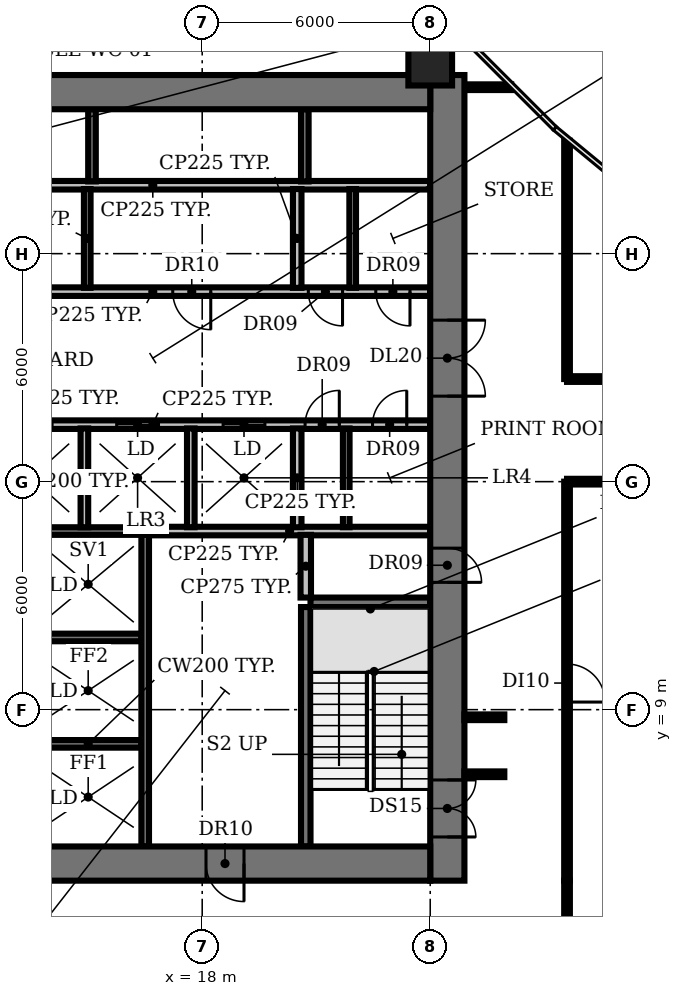
"""IFC4 building model, lengths in metres.
Left out: names, types, materials, properties, quantities, classifications, styles, units other than length and angle.
Written with IfcOpenShell. Run it as: python <this file> out.ifc"""

import sys

from ifc_helpers import new_model, si_unit, direction, frame, frame_2d, origin, origin_2d, place, context, subcontext, project, spatial, rectangle, circle, extrude, element, fill, save


model = new_model("IFC4")
c1 = context("Model", 3, precision=1e-05, world=origin(), true_north=direction((0.0, 1.0)))
c2 = subcontext(c1, "Body", "Model", "MODEL_VIEW")
j1 = project(units=[si_unit("LENGTHUNIT", "METRE"), si_unit("PLANEANGLEUNIT", "RADIAN")], contexts=[c1])
p1 = place(None, origin())
s1 = spatial("IfcSite", under=j1, at=p1, CompositionType="ELEMENT")
p2 = place(p1, origin())
s2 = spatial("IfcBuilding", under=s1, at=p2, CompositionType="ELEMENT")
p3 = place(p2, frame((0.0, 0.0, 75.2)))
s3 = spatial("IfcBuildingStorey", under=s2, at=p3, CompositionType="ELEMENT", Elevation=75.2)
p4 = place(p3, frame((24.0, 26.0, 0.0), z_axis=(0.0, 0.0, 1.0), x_axis=(1.0, 0.0, 0.0)))
e1 = element("IfcColumn", 1, at=p4, inside=s3, PredefinedType="COLUMN", context=c2, shape_type="SweptSolid", body=[
    extrude(circle(Radius=0.575, at=origin_2d()), origin(), (0.0, 0.0, 1.0), 3.2),
])
for number, where, z_axis, x_axis in (
    (2, (13.6, 8.1, 0.0), (0.0, 0.0, 1.0), (1.0, 0.0, 0.0)),
    (3, (13.6, 10.9, 0.0), (0.0, 0.0, 1.0), (1.0, 0.0, 0.0)),
):
    element("IfcWall", number, at=place(p3, frame(where, z_axis=z_axis, x_axis=x_axis)), inside=s3, PredefinedType="SHEAR", context=c2, shape_type="SweptSolid", body=[
        extrude(rectangle(XDim=2.8, YDim=0.2, at=frame_2d((1.4, 0.0))), origin(), (0.0, 0.0, 1.0), 3.8),
    ])
p5 = place(p3, frame((20.85, 11.825, 0.0), z_axis=(0.0, 0.0, 1.0), x_axis=(1.0, 0.0, 0.0)))
e4 = element("IfcWall", 4, at=p5, inside=s3, PredefinedType="SHEAR", context=c2, shape_type="SweptSolid", body=[
    extrude(rectangle(XDim=3.15, YDim=0.25, at=frame_2d((1.575, 0.0))), origin(), (0.0, 0.0, 1.0), 3.8),
])
p6 = place(p3, frame((13.6, 13.7, 0.0), z_axis=(0.0, 0.0, 1.0), x_axis=(1.0, 0.0, 0.0)))
e5 = element("IfcWall", 5, at=p6, inside=s3, PredefinedType="SHEAR", context=c2, shape_type="SweptSolid", body=[
    extrude(rectangle(XDim=2.8, YDim=0.2, at=frame_2d((1.4, 0.0))), origin(), (0.0, 0.0, 1.0), 3.8),
])
p7 = place(p3, frame((16.6, 13.7, 0.0), z_axis=(0.0, 0.0, 1.0), x_axis=(1.0, 0.0, 0.0)))
e6 = element("IfcWall", 6, at=p7, inside=s3, PredefinedType="PARTITIONING", context=c2, shape_type="SweptSolid", body=[
    extrude(rectangle(XDim=7.4, YDim=0.225, at=frame_2d((3.7, 0.0))), origin(), (0.0, 0.0, 1.0), 3.8),
])
p8 = place(p3, frame((9.4, 16.5, 0.0), z_axis=(0.0, 0.0, 1.0), x_axis=(1.0, 0.0, 0.0)))
e7 = element("IfcWall", 7, at=p8, inside=s3, PredefinedType="PARTITIONING", context=c2, shape_type="SweptSolid", body=[
    extrude(rectangle(XDim=14.6, YDim=0.225, at=frame_2d((7.3, 0.0))), origin(), (0.0, 0.0, 1.0), 3.8),
])
p9 = place(p8, frame((0.75, 0.0, 0.0)))
e8 = element("IfcOpeningElement", 8, at=p9, cuts=e7, PredefinedType="OPENING", context=c2, shape_type="SweptSolid", body=[
    extrude(rectangle(XDim=1.1, YDim=2.1, at=frame_2d((0.55, 1.05))), frame((0.0, 0.123, 0.0), z_axis=(0.0, -1.0, 0.0), x_axis=(1.0, 0.0, 0.0)), (0.0, 0.0, 1.0), 0.245),
])
p10 = place(p8, frame((3.55, 0.0, 0.0)))
e9 = element("IfcOpeningElement", 9, at=p10, cuts=e7, PredefinedType="OPENING", context=c2, shape_type="SweptSolid", body=[
    extrude(rectangle(XDim=1.1, YDim=2.1, at=frame_2d((0.55, 1.05))), frame((0.0, 0.123, 0.0), z_axis=(0.0, -1.0, 0.0), x_axis=(1.0, 0.0, 0.0)), (0.0, 0.0, 1.0), 0.245),
])
p11 = place(p8, frame((6.35, 0.0, 0.0)))
e10 = element("IfcOpeningElement", 10, at=p11, cuts=e7, PredefinedType="OPENING", context=c2, shape_type="SweptSolid", body=[
    extrude(rectangle(XDim=1.1, YDim=2.1, at=frame_2d((0.55, 1.05))), frame((0.0, 0.123, 0.0), z_axis=(0.0, -1.0, 0.0), x_axis=(1.0, 0.0, 0.0)), (0.0, 0.0, 1.0), 0.245),
])
p12 = place(p8, frame((9.15, 0.0, 0.0)))
e11 = element("IfcOpeningElement", 11, at=p12, cuts=e7, PredefinedType="OPENING", context=c2, shape_type="SweptSolid", body=[
    extrude(rectangle(XDim=1.1, YDim=2.1, at=frame_2d((0.55, 1.05))), frame((0.0, 0.123, 0.0), z_axis=(0.0, -1.0, 0.0), x_axis=(1.0, 0.0, 0.0)), (0.0, 0.0, 1.0), 0.245),
])
p13 = place(p8, frame((11.308, 0.0, 0.0)))
e12 = element("IfcOpeningElement", 12, at=p13, cuts=e7, PredefinedType="OPENING", context=c2, shape_type="SweptSolid", body=[
    extrude(rectangle(XDim=0.9, YDim=2.1, at=frame_2d((0.45, 1.05))), frame((0.0, 0.123, 0.0), z_axis=(0.0, -1.0, 0.0), x_axis=(1.0, 0.0, 0.0)), (0.0, 0.0, 1.0), 0.245),
])
p14 = place(p8, frame((13.083, 0.0, 0.0)))
e13 = element("IfcOpeningElement", 13, at=p14, cuts=e7, PredefinedType="OPENING", context=c2, shape_type="SweptSolid", body=[
    extrude(rectangle(XDim=0.9, YDim=2.1, at=frame_2d((0.45, 1.05))), frame((0.0, 0.123, 0.0), z_axis=(0.0, -1.0, 0.0), x_axis=(1.0, 0.0, 0.0)), (0.0, 0.0, 1.0), 0.245),
])
p15 = place(p3, frame((24.0, 20.0, 0.0), z_axis=(0.0, 0.0, 1.0), x_axis=(-1.0, 0.0, 0.0)))
e14 = element("IfcWall", 14, at=p15, inside=s3, PredefinedType="PARTITIONING", context=c2, shape_type="SweptSolid", body=[
    extrude(rectangle(XDim=14.6, YDim=0.225, at=frame_2d((7.3, 0.0))), origin(), (0.0, 0.0, 1.0), 3.8),
])
p16 = place(p15, frame((11.35, 0.0, 0.0)))
e15 = element("IfcOpeningElement", 15, at=p16, cuts=e14, PredefinedType="OPENING", context=c2, shape_type="SweptSolid", body=[
    extrude(rectangle(XDim=1.0, YDim=2.1, at=frame_2d((0.5, 1.05))), frame((0.0, 0.123, 0.0), z_axis=(0.0, -1.0, 0.0), x_axis=(1.0, 0.0, 0.0)), (0.0, 0.0, 1.0), 0.245),
])
p17 = place(p15, frame((5.775, 0.0, 0.0)))
e16 = element("IfcOpeningElement", 16, at=p17, cuts=e14, PredefinedType="OPENING", context=c2, shape_type="SweptSolid", body=[
    extrude(rectangle(XDim=1.0, YDim=2.1, at=frame_2d((0.5, 1.05))), frame((0.0, 0.123, 0.0), z_axis=(0.0, -1.0, 0.0), x_axis=(1.0, 0.0, 0.0)), (0.0, 0.0, 1.0), 0.245),
])
p18 = place(p15, frame((2.308, 0.0, 0.0)))
e17 = element("IfcOpeningElement", 17, at=p18, cuts=e14, PredefinedType="OPENING", context=c2, shape_type="SweptSolid", body=[
    extrude(rectangle(XDim=0.9, YDim=2.1, at=frame_2d((0.45, 1.05))), frame((0.0, 0.123, 0.0), z_axis=(0.0, -1.0, 0.0), x_axis=(1.0, 0.0, 0.0)), (0.0, 0.0, 1.0), 0.245),
])
p19 = place(p15, frame((0.532, 0.0, 0.0)))
e18 = element("IfcOpeningElement", 18, at=p19, cuts=e14, PredefinedType="OPENING", context=c2, shape_type="SweptSolid", body=[
    extrude(rectangle(XDim=0.9, YDim=2.1, at=frame_2d((0.45, 1.05))), frame((0.0, 0.123, 0.0), z_axis=(0.0, -1.0, 0.0), x_axis=(1.0, 0.0, 0.0)), (0.0, 0.0, 1.0), 0.245),
])
p20 = place(p3, frame((9.4, 22.8, 0.0), z_axis=(0.0, 0.0, 1.0), x_axis=(1.0, 0.0, 0.0)))
e19 = element("IfcWall", 19, at=p20, inside=s3, PredefinedType="PARTITIONING", context=c2, shape_type="SweptSolid", body=[
    extrude(rectangle(XDim=14.6, YDim=0.225, at=frame_2d((7.3, 0.0))), origin(), (0.0, 0.0, 1.0), 3.8),
])
p21 = place(p3, frame((14.9, 13.8, 0.0), z_axis=(0.0, 0.0, 1.0), x_axis=(0.0, 1.0, 0.0)))
e20 = element("IfcWall", 20, at=p21, inside=s3, PredefinedType="SOLIDWALL", context=c2, shape_type="SweptSolid", body=[
    extrude(rectangle(XDim=2.6, YDim=0.2, at=frame_2d((1.3, 0.0))), origin(), (0.0, 0.0, 1.0), 3.8),
])
p22 = place(p3, frame((14.975, 20.1, 0.0), z_axis=(0.0, 0.0, 1.0), x_axis=(0.0, 1.0, 0.0)))
e21 = element("IfcWall", 21, at=p22, inside=s3, PredefinedType="PARTITIONING", context=c2, shape_type="SweptSolid", body=[
    extrude(rectangle(XDim=2.6, YDim=0.175, at=frame_2d((1.3, 0.0))), origin(), (0.0, 0.0, 1.0), 3.8),
])
p23 = place(p3, frame((15.1, 22.9, 0.0), z_axis=(0.0, 0.0, 1.0), x_axis=(0.0, 1.0, 0.0)))
e22 = element("IfcWall", 22, at=p23, inside=s3, PredefinedType="SHEAR", context=c2, shape_type="SweptSolid", body=[
    extrude(rectangle(XDim=1.9, YDim=0.2, at=frame_2d((0.95, 0.0))), origin(), (0.0, 0.0, 1.0), 3.8),
])
p24 = place(p3, frame((16.5, 5.4, 0.0), z_axis=(0.0, 0.0, 1.0), x_axis=(0.0, 1.0, 0.0)))
e23 = element("IfcWall", 23, at=p24, inside=s3, PredefinedType="SHEAR", context=c2, shape_type="SweptSolid", body=[
    extrude(rectangle(XDim=8.2, YDim=0.2, at=frame_2d((4.1, 0.0))), origin(), (0.0, 0.0, 1.0), 3.8),
])
p25 = place(p3, frame((17.7, 13.8, 0.0), z_axis=(0.0, 0.0, 1.0), x_axis=(0.0, 1.0, 0.0)))
e24 = element("IfcWall", 24, at=p25, inside=s3, PredefinedType="SOLIDWALL", context=c2, shape_type="SweptSolid", body=[
    extrude(rectangle(XDim=2.6, YDim=0.2, at=frame_2d((1.3, 0.0))), origin(), (0.0, 0.0, 1.0), 3.8),
])
for number, where, z_axis, x_axis in (
    (25, (20.5, 13.8, 0.0), (0.0, 0.0, 1.0), (0.0, 1.0, 0.0)),
    (26, (20.5, 20.1, 0.0), (0.0, 0.0, 1.0), (0.0, 1.0, 0.0)),
):
    element("IfcWall", number, at=place(p3, frame(where, z_axis=z_axis, x_axis=x_axis)), inside=s3, PredefinedType="PARTITIONING", context=c2, shape_type="SweptSolid", body=[
        extrude(rectangle(XDim=2.6, YDim=0.225, at=frame_2d((1.3, 0.0))), origin(), (0.0, 0.0, 1.0), 3.8),
    ])
p26 = place(p3, frame((20.7, 22.9, 0.0), z_axis=(0.0, 0.0, 1.0), x_axis=(0.0, 1.0, 0.0)))
e27 = element("IfcWall", 27, at=p26, inside=s3, PredefinedType="SHEAR", context=c2, shape_type="SweptSolid", body=[
    extrude(rectangle(XDim=1.9, YDim=0.2, at=frame_2d((0.95, 0.0))), origin(), (0.0, 0.0, 1.0), 3.8),
])
p27 = place(p3, frame((20.725, 5.4, 0.0), z_axis=(0.0, 0.0, 1.0), x_axis=(0.0, 1.0, 0.0)))
e28 = element("IfcWall", 28, at=p27, inside=s3, PredefinedType="SHEAR", context=c2, shape_type="SweptSolid", body=[
    extrude(rectangle(XDim=6.3, YDim=0.25, at=frame_2d((3.15, 0.0))), origin(), (0.0, 0.0, 1.0), 3.8),
])
p28 = place(p3, frame((20.725, 11.95, 0.0), z_axis=(0.0, 0.0, 1.0), x_axis=(0.0, 1.0, 0.0)))
e29 = element("IfcWall", 29, at=p28, inside=s3, PredefinedType="PARTITIONING", context=c2, shape_type="SweptSolid", body=[
    extrude(rectangle(XDim=1.65, YDim=0.275, at=frame_2d((0.825, 0.0))), origin(), (0.0, 0.0, 1.0), 3.8),
])
for number, where, z_axis, x_axis in (
    (30, (21.79, 13.8, 0.0), (0.0, 0.0, 1.0), (0.0, 1.0, 0.0)),
    (31, (21.96, 20.1, 0.0), (0.0, 0.0, 1.0), (0.0, 1.0, 0.0)),
):
    element("IfcWall", number, at=place(p3, frame(where, z_axis=z_axis, x_axis=x_axis)), inside=s3, PredefinedType="PARTITIONING", context=c2, shape_type="SweptSolid", body=[
        extrude(rectangle(XDim=2.6, YDim=0.175, at=frame_2d((1.3, 0.0))), origin(), (0.0, 0.0, 1.0), 3.8),
    ])
p29 = place(p3, frame((24.45, 25.7, 0.0), z_axis=(0.0, 0.0, 1.0), x_axis=(0.0, -1.0, 0.0)))
e32 = element("IfcWall", 32, at=p29, inside=s3, PredefinedType="SHEAR", context=c2, shape_type="SweptSolid", body=[
    extrude(rectangle(XDim=21.2, YDim=0.9, at=frame_2d((10.6, 0.0))), origin(), (0.0, 0.0, 1.0), 3.8),
])
p30 = place(p29, frame((18.55, 0.0, 0.0)))
e33 = element("IfcOpeningElement", 33, at=p30, cuts=e32, PredefinedType="OPENING", context=c2, shape_type="SweptSolid", body=[
    extrude(rectangle(XDim=1.5, YDim=2.1, at=frame_2d((0.75, 1.05))), frame((0.0, 0.46, 0.0), z_axis=(0.0, -1.0, 0.0), x_axis=(1.0, 0.0, 0.0)), (0.0, 0.0, 1.0), 0.92),
])
p31 = place(p29, frame((12.45, 0.0, 0.0)))
e34 = element("IfcOpeningElement", 34, at=p31, cuts=e32, PredefinedType="OPENING", context=c2, shape_type="SweptSolid", body=[
    extrude(rectangle(XDim=0.9, YDim=2.1, at=frame_2d((0.45, 1.05))), frame((0.0, 0.46, 0.0), z_axis=(0.0, -1.0, 0.0), x_axis=(1.0, 0.0, 0.0)), (0.0, 0.0, 1.0), 0.92),
])
p32 = place(p29, frame((6.45, 0.0, 0.0)))
e35 = element("IfcOpeningElement", 35, at=p32, cuts=e32, PredefinedType="OPENING", context=c2, shape_type="SweptSolid", body=[
    extrude(rectangle(XDim=2.0, YDim=2.1, at=frame_2d((1.0, 1.05))), frame((0.0, 0.46, 0.0), z_axis=(0.0, -1.0, 0.0), x_axis=(1.0, 0.0, 0.0)), (0.0, 0.0, 1.0), 0.92),
])
p33 = place(p3, frame((24.0, 4.95, 0.0), z_axis=(0.0, 0.0, 1.0), x_axis=(-1.0, 0.0, 0.0)))
e36 = element("IfcWall", 36, at=p33, inside=s3, PredefinedType="SHEAR", context=c2, shape_type="SweptSolid", body=[
    extrude(rectangle(XDim=18.0, YDim=0.9, at=frame_2d((9.0, 0.0))), origin(), (0.0, 0.0, 1.0), 3.8),
])
p34 = place(p33, frame((13.0, 0.0, 0.0)))
e37 = element("IfcOpeningElement", 37, at=p34, cuts=e36, PredefinedType="OPENING", context=c2, shape_type="SweptSolid", body=[
    extrude(rectangle(XDim=1.2, YDim=2.1, at=frame_2d((0.6, 1.05))), frame((0.0, 0.46, 0.0), z_axis=(0.0, -1.0, 0.0), x_axis=(1.0, 0.0, 0.0)), (0.0, 0.0, 1.0), 0.92),
])
p35 = place(p33, frame((4.9, 0.0, 0.0)))
e38 = element("IfcOpeningElement", 38, at=p35, cuts=e36, PredefinedType="OPENING", context=c2, shape_type="SweptSolid", body=[
    extrude(rectangle(XDim=1.0, YDim=2.1, at=frame_2d((0.5, 1.05))), frame((0.0, 0.46, 0.0), z_axis=(0.0, -1.0, 0.0), x_axis=(1.0, 0.0, 0.0)), (0.0, 0.0, 1.0), 0.92),
])
p36 = place(p3, frame((6.0, 25.25, 0.0), z_axis=(0.0, 0.0, 1.0), x_axis=(1.0, 0.0, 0.0)))
e39 = element("IfcWall", 39, at=p36, inside=s3, PredefinedType="SHEAR", context=c2, shape_type="SweptSolid", body=[
    extrude(rectangle(XDim=18.0, YDim=0.9, at=frame_2d((9.0, 0.0))), origin(), (0.0, 0.0, 1.0), 3.8),
])
for number, where, z_axis, x_axis in (
    (40, (24.9, 7.3, 0.0), (0.0, 0.0, 1.0), (1.0, 0.0, 0.0)),
    (41, (24.9, 8.8, 0.0), (0.0, 0.0, 1.0), (1.0, 0.0, 0.0)),
):
    element("IfcWall", number, at=place(p3, frame(where, z_axis=z_axis, x_axis=x_axis)), inside=s3, PredefinedType="PARTITIONING", context=c2, shape_type="SweptSolid", body=[
        extrude(rectangle(XDim=1.05, YDim=0.15, at=frame_2d((0.525, 0.0))), origin(), (0.0, 0.0, 1.0), 2.78),
    ])
p37 = place(p3, frame((25.0, 25.38, 0.0), z_axis=(0.0, 0.0, 1.0), x_axis=(1.0, 0.0, 0.0)))
e42 = element("IfcWall", 42, at=p37, inside=s3, PredefinedType="PARTITIONING", context=c2, shape_type="SweptSolid", body=[
    extrude(rectangle(XDim=1.13, YDim=0.15, at=frame_2d((0.565, 0.0))), origin(), (0.0, 0.0, 1.0), 2.78),
])
p38 = place(p3, frame((27.6, 0.6, 0.0), z_axis=(0.0, 0.0, 1.0), x_axis=(0.0, 1.0, 0.0)))
e43 = element("IfcWall", 43, at=p38, inside=s3, PredefinedType="PARTITIONING", context=c2, shape_type="SweptSolid", body=[
    extrude(rectangle(XDim=3.9, YDim=0.15, at=frame_2d((1.95, 0.0))), origin(), (0.0, 0.0, 1.0), 2.78),
])
p39 = place(p3, frame((27.6, 15.0, 0.0), z_axis=(0.0, 0.0, 1.0), x_axis=(0.0, -1.0, 0.0)))
e44 = element("IfcWall", 44, at=p39, inside=s3, PredefinedType="PARTITIONING", context=c2, shape_type="SweptSolid", body=[
    extrude(rectangle(XDim=10.5, YDim=0.15, at=frame_2d((5.25, 0.0))), origin(), (0.0, 0.0, 1.0), 2.78),
])
p40 = place(p39, frame((4.8, 0.0, 0.0)))
e45 = element("IfcOpeningElement", 45, at=p40, cuts=e44, PredefinedType="OPENING", context=c2, shape_type="SweptSolid", body=[
    extrude(rectangle(XDim=1.0, YDim=2.1, at=frame_2d((0.5, 1.05))), frame((0.0, 0.085, 0.0), z_axis=(0.0, -1.0, 0.0), x_axis=(1.0, 0.0, 0.0)), (0.0, 0.0, 1.0), 0.17),
])
p41 = place(p3, frame((27.6, 15.0, 0.0), z_axis=(0.0, 0.0, 1.0), x_axis=(1.0, 0.0, 0.0)))
e46 = element("IfcWall", 46, at=p41, inside=s3, PredefinedType="PARTITIONING", context=c2, shape_type="SweptSolid", body=[
    extrude(rectangle(XDim=8.4, YDim=0.15, at=frame_2d((4.2, 0.0))), origin(), (0.0, 0.0, 1.0), 2.78),
])
p42 = place(p3, frame((27.6, 17.7, 0.0), z_axis=(0.0, 0.0, 1.0), x_axis=(0.0, 1.0, 0.0)))
e47 = element("IfcWall", 47, at=p42, inside=s3, PredefinedType="PARTITIONING", context=c2, shape_type="SweptSolid", body=[
    extrude(rectangle(XDim=6.27, YDim=0.15, at=frame_2d((3.135, 0.0))), origin(), (0.0, 0.0, 1.0), 2.78),
])
p43 = place(p3, frame((42.0, 17.7, 0.0), z_axis=(0.0, 0.0, 1.0), x_axis=(-1.0, 0.0, 0.0)))
e48 = element("IfcWall", 48, at=p43, inside=s3, PredefinedType="PARTITIONING", context=c2, shape_type="SweptSolid", body=[
    extrude(rectangle(XDim=14.4, YDim=0.15, at=frame_2d((7.2, 0.0))), origin(), (0.0, 0.0, 1.0), 2.78),
])
p44 = place(p43, frame((7.1, 0.0, 0.0)))
e49 = element("IfcOpeningElement", 49, at=p44, cuts=e48, PredefinedType="OPENING", context=c2, shape_type="SweptSolid", body=[
    extrude(rectangle(XDim=1.8, YDim=2.1, at=frame_2d((0.9, 1.05))), frame((0.0, 0.085, 0.0), z_axis=(0.0, -1.0, 0.0), x_axis=(1.0, 0.0, 0.0)), (0.0, 0.0, 1.0), 0.17),
])
p45 = place(p11, origin())
e50 = element("IfcDoor", 50, at=p45, inside=s3, OperationType="DOUBLE_DOOR_SLIDING", PredefinedType="DOOR", context=c2, shape_type="SweptSolid", body=[
    extrude(rectangle(XDim=1.1, YDim=2.1, at=frame_2d((0.55, 1.05))), frame((0.0, 0.025, 0.0), z_axis=(0.0, -1.0, 0.0), x_axis=(1.0, 0.0, 0.0)), (0.0, 0.0, 1.0), 0.05),
])
fill(e10, e50)
p46 = place(p12, origin())
e51 = element("IfcDoor", 51, at=p46, inside=s3, OperationType="DOUBLE_DOOR_SLIDING", PredefinedType="DOOR", context=c2, shape_type="SweptSolid", body=[
    extrude(rectangle(XDim=1.1, YDim=2.1, at=frame_2d((0.55, 1.05))), frame((0.0, 0.025, 0.0), z_axis=(0.0, -1.0, 0.0), x_axis=(1.0, 0.0, 0.0)), (0.0, 0.0, 1.0), 0.05),
])
fill(e11, e51)
p47 = place(p13, origin())
e52 = element("IfcDoor", 52, at=p47, inside=s3, OperationType="SINGLE_SWING_RIGHT", PredefinedType="DOOR", context=c2, shape_type="SweptSolid", body=[
    extrude(rectangle(XDim=0.9, YDim=2.1, at=frame_2d((0.45, 1.05))), frame((0.0, 0.025, 0.0), z_axis=(0.0, -1.0, 0.0), x_axis=(1.0, 0.0, 0.0)), (0.0, 0.0, 1.0), 0.05),
])
fill(e12, e52)
p48 = place(p14, origin())
e53 = element("IfcDoor", 53, at=p48, inside=s3, OperationType="SINGLE_SWING_RIGHT", PredefinedType="DOOR", context=c2, shape_type="SweptSolid", body=[
    extrude(rectangle(XDim=0.9, YDim=2.1, at=frame_2d((0.45, 1.05))), frame((0.0, 0.025, 0.0), z_axis=(0.0, -1.0, 0.0), x_axis=(1.0, 0.0, 0.0)), (0.0, 0.0, 1.0), 0.05),
])
fill(e13, e53)
p49 = place(p17, origin())
e54 = element("IfcDoor", 54, at=p49, inside=s3, OperationType="SINGLE_SWING_LEFT", PredefinedType="DOOR", context=c2, shape_type="SweptSolid", body=[
    extrude(rectangle(XDim=1.0, YDim=2.1, at=frame_2d((0.5, 1.05))), frame((0.0, 0.025, 0.0), z_axis=(0.0, -1.0, 0.0), x_axis=(1.0, 0.0, 0.0)), (0.0, 0.0, 1.0), 0.05),
])
fill(e16, e54)
p50 = place(p18, origin())
e55 = element("IfcDoor", 55, at=p50, inside=s3, OperationType="SINGLE_SWING_LEFT", PredefinedType="DOOR", context=c2, shape_type="SweptSolid", body=[
    extrude(rectangle(XDim=0.9, YDim=2.1, at=frame_2d((0.45, 1.05))), frame((0.0, 0.025, 0.0), z_axis=(0.0, -1.0, 0.0), x_axis=(1.0, 0.0, 0.0)), (0.0, 0.0, 1.0), 0.05),
])
fill(e17, e55)
p51 = place(p19, origin())
e56 = element("IfcDoor", 56, at=p51, inside=s3, OperationType="SINGLE_SWING_LEFT", PredefinedType="DOOR", context=c2, shape_type="SweptSolid", body=[
    extrude(rectangle(XDim=0.9, YDim=2.1, at=frame_2d((0.45, 1.05))), frame((0.0, 0.025, 0.0), z_axis=(0.0, -1.0, 0.0), x_axis=(1.0, 0.0, 0.0)), (0.0, 0.0, 1.0), 0.05),
])
fill(e18, e56)
p52 = place(p30, origin())
e57 = element("IfcDoor", 57, at=p52, inside=s3, OperationType="DOUBLE_DOOR_SINGLE_SWING", PredefinedType="DOOR", context=c2, shape_type="SweptSolid", body=[
    extrude(rectangle(XDim=1.5, YDim=2.1, at=frame_2d((0.75, 1.05))), frame((0.0, 0.025, 0.0), z_axis=(0.0, -1.0, 0.0), x_axis=(1.0, 0.0, 0.0)), (0.0, 0.0, 1.0), 0.05),
])
fill(e33, e57)
p53 = place(p31, origin())
e58 = element("IfcDoor", 58, at=p53, inside=s3, OperationType="SINGLE_SWING_RIGHT", PredefinedType="DOOR", context=c2, shape_type="SweptSolid", body=[
    extrude(rectangle(XDim=0.9, YDim=2.1, at=frame_2d((0.45, 1.05))), frame((0.0, -0.39, 0.0), z_axis=(0.0, -1.0, 0.0), x_axis=(1.0, 0.0, 0.0)), (0.0, 0.0, 1.0), 0.05),
])
fill(e34, e58)
p54 = place(p32, origin())
e59 = element("IfcDoor", 59, at=p54, inside=s3, OperationType="DOUBLE_DOOR_SINGLE_SWING", PredefinedType="DOOR", context=c2, shape_type="SweptSolid", body=[
    extrude(rectangle(XDim=2.0, YDim=2.1, at=frame_2d((1.0, 1.05))), frame((0.0, 0.025, 0.0), z_axis=(0.0, -1.0, 0.0), x_axis=(1.0, 0.0, 0.0)), (0.0, 0.0, 1.0), 0.05),
])
fill(e35, e59)
p55 = place(p35, origin())
e60 = element("IfcDoor", 60, at=p55, inside=s3, OperationType="SINGLE_SWING_LEFT", PredefinedType="DOOR", context=c2, shape_type="SweptSolid", body=[
    extrude(rectangle(XDim=1.0, YDim=2.1, at=frame_2d((0.5, 1.05))), frame((0.0, -0.39, 0.0), z_axis=(0.0, -1.0, 0.0), x_axis=(1.0, 0.0, 0.0)), (0.0, 0.0, 1.0), 0.05),
])
fill(e38, e60)
p56 = place(p40, origin())
e61 = element("IfcDoor", 61, at=p56, inside=s3, OperationType="SINGLE_SWING_RIGHT", PredefinedType="DOOR", context=c2, shape_type="SweptSolid", body=[
    extrude(rectangle(XDim=1.0, YDim=2.1, at=frame_2d((0.5, 1.05))), frame((0.0, 0.025, 0.0), z_axis=(0.0, -1.0, 0.0), x_axis=(1.0, 0.0, 0.0)), (0.0, 0.0, 1.0), 0.05),
])
fill(e45, e61)
save(model, sys.argv[1])
